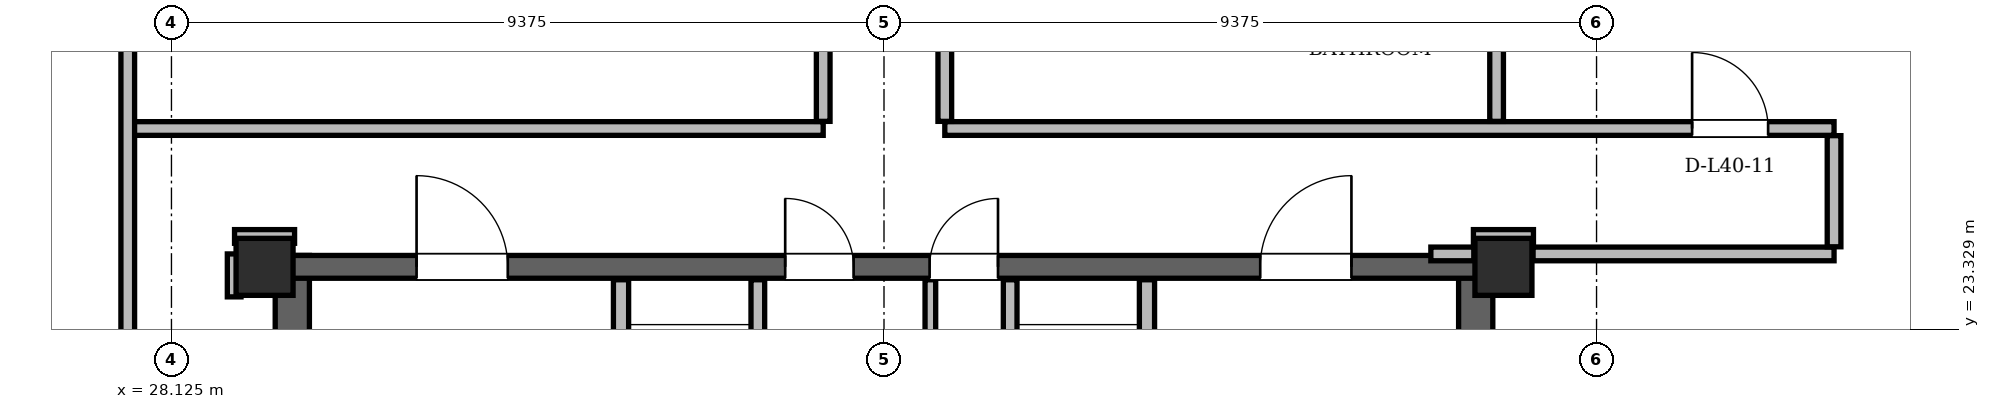
"""IFC4 building model, lengths in metres.
Left out: names, types, materials, properties, quantities, classifications, styles, units other than length and angle.
Written with IfcOpenShell. Run it as: python <this file> out.ifc"""

import sys

from ifc_helpers import new_model, si_unit, direction, frame, frame_2d, origin, origin_2d, place, context, subcontext, project, spatial, rectangle, hollow_rectangle, extrude, element, fill, save


model = new_model("IFC4")
c1 = context("Model", 3, precision=1e-05, world=origin(), true_north=direction((0.0, 1.0)))
c2 = subcontext(c1, "Body", "Model", "MODEL_VIEW")
j1 = project(units=[si_unit("LENGTHUNIT", "METRE"), si_unit("PLANEANGLEUNIT", "RADIAN")], contexts=[c1])
p1 = place(None, origin())
s1 = spatial("IfcSite", under=j1, at=p1, CompositionType="ELEMENT")
p2 = place(p1, origin())
s2 = spatial("IfcBuilding", under=s1, at=p2, CompositionType="ELEMENT")
p3 = place(p2, frame((0.0, 0.0, 153.0)))
s3 = spatial("IfcBuildingStorey", under=s2, at=p3, CompositionType="ELEMENT", Elevation=153.0)
for number, where, z_axis, x_axis in (
    (1, (45.65, 24.15, 0.0), (0.0, 0.0, 1.0), (1.0, 0.0, 0.0)),
    (2, (29.35, 24.15, 0.0), (0.0, 0.0, 1.0), (1.0, 0.0, 0.0)),
):
    element("IfcColumn", number, at=place(p3, frame(where, z_axis=z_axis, x_axis=x_axis)), inside=s3, PredefinedType="COLUMN", context=c2, shape_type="SweptSolid", body=[
        extrude(hollow_rectangle(XDim=0.75, YDim=0.75, WallThickness=0.06, at=origin_2d()), origin(), (0.0, 0.0, 1.0), 3.6),
    ])
for number, where, z_axis, x_axis in (
    (3, (29.715, 11.0, 0.0), (0.0, 0.0, 1.0), (0.0, 1.0, 0.0)),
    (4, (45.285, 11.0, 0.0), (0.0, 0.0, 1.0), (0.0, 1.0, 0.0)),
):
    element("IfcWall", number, at=place(p3, frame(where, z_axis=z_axis, x_axis=x_axis)), inside=s3, PredefinedType="SHEAR", context=c2, shape_type="SweptSolid", body=[
        extrude(rectangle(XDim=13.3, YDim=0.45, at=frame_2d((6.65, 0.0))), origin(), (0.0, 0.0, 1.0), 3.38),
    ])
p4 = place(p3, frame((29.65, 24.15, 0.0), z_axis=(0.0, 0.0, 1.0), x_axis=(1.0, 0.0, 0.0)))
e5 = element("IfcWall", 5, at=p4, inside=s3, PredefinedType="SHEAR", context=c2, shape_type="SweptSolid", body=[
    extrude(rectangle(XDim=15.7, YDim=0.3, at=frame_2d((7.85, 0.0))), origin(), (0.0, 0.0, 1.0), 3.38),
])
p5 = place(p4, frame((1.7, 0.0, 0.0)))
e6 = element("IfcOpeningElement", 6, at=p5, cuts=e5, PredefinedType="OPENING", context=c2, shape_type="SweptSolid", body=[
    extrude(rectangle(XDim=1.2, YDim=2.2, at=frame_2d((0.6, 1.1))), frame((0.0, 0.15, 0.0), z_axis=(0.0, -1.0, 0.0), x_axis=(1.0, 0.0, 0.0)), (0.0, 0.0, 1.0), 0.3),
])
p6 = place(p4, frame((12.8, 0.0, 0.0)))
e7 = element("IfcOpeningElement", 7, at=p6, cuts=e5, PredefinedType="OPENING", context=c2, shape_type="SweptSolid", body=[
    extrude(rectangle(XDim=1.2, YDim=2.2, at=frame_2d((0.6, 1.1))), frame((0.0, 0.15, 0.0), z_axis=(0.0, -1.0, 0.0), x_axis=(1.0, 0.0, 0.0)), (0.0, 0.0, 1.0), 0.3),
])
p7 = place(p4, frame((6.55, 0.0, 0.0)))
e8 = element("IfcOpeningElement", 8, at=p7, cuts=e5, PredefinedType="OPENING", context=c2, shape_type="SweptSolid", body=[
    extrude(rectangle(XDim=0.9, YDim=2.05, at=frame_2d((0.45, 1.025))), frame((0.0, 0.15, 0.0), z_axis=(0.0, -1.0, 0.0), x_axis=(1.0, 0.0, 0.0)), (0.0, 0.0, 1.0), 0.3),
])
p8 = place(p4, frame((8.45, 0.0, 0.0)))
e9 = element("IfcOpeningElement", 9, at=p8, cuts=e5, PredefinedType="OPENING", context=c2, shape_type="SweptSolid", body=[
    extrude(rectangle(XDim=0.9, YDim=2.05, at=frame_2d((0.45, 1.025))), frame((0.0, 0.15, 0.0), z_axis=(0.0, -1.0, 0.0), x_axis=(1.0, 0.0, 0.0)), (0.0, 0.0, 1.0), 0.3),
])
p9 = place(p3, frame((59.952, 12.544, 0.0), z_axis=(0.0, 0.0, 1.0), x_axis=(-0.500000946011, 0.866024857604, 0.0)))
e10 = element("IfcWall", 10, at=p9, inside=s3, PredefinedType="SOLIDWALL", context=c2, shape_type="SweptSolid", body=[
    extrude(rectangle(XDim=35.54, YDim=0.34, at=frame_2d((17.77, 0.0))), origin(), (0.0, 0.0, 1.0), 2.6),
])
p10 = place(p9, frame((6.579, 0.0, 0.0)))
e11 = element("IfcOpeningElement", 11, at=p10, cuts=e10, PredefinedType="OPENING", context=c2, shape_type="SweptSolid", body=[
    extrude(rectangle(XDim=1.5, YDim=2.2, at=frame_2d((0.75, 1.1))), frame((0.0, 0.17, 0.0), z_axis=(0.0, -1.0, 0.0), x_axis=(1.0, 0.0, 0.0)), (0.0, 0.0, 1.0), 0.34),
])
p11 = place(p9, frame((26.105, 0.0, 0.0)))
e12 = element("IfcOpeningElement", 12, at=p11, cuts=e10, PredefinedType="OPENING", context=c2, shape_type="SweptSolid", body=[
    extrude(rectangle(XDim=1.3, YDim=2.2, at=frame_2d((0.65, 1.1))), frame((0.0, 0.17, 0.0), z_axis=(0.0, -1.0, 0.0), x_axis=(1.0, 0.0, 0.0)), (0.0, 0.0, 1.0), 0.34),
])
p12 = place(p9, frame((0.816, 0.0, 0.85)))
e13 = element("IfcOpeningElement", 13, at=p12, cuts=e10, PredefinedType="OPENING", context=c2, shape_type="SweptSolid", body=[
    extrude(rectangle(XDim=1.2, YDim=1.48, at=frame_2d((0.6, 0.74))), frame((0.0, 0.17, 0.0), z_axis=(0.0, -1.0, 0.0), x_axis=(1.0, 0.0, 0.0)), (0.0, 0.0, 1.0), 0.34),
])
p13 = place(p9, frame((17.181, 0.0, 0.85)))
e14 = element("IfcOpeningElement", 14, at=p13, cuts=e10, PredefinedType="OPENING", context=c2, shape_type="SweptSolid", body=[
    extrude(rectangle(XDim=2.6, YDim=1.64, at=frame_2d((1.3, 0.82))), frame((0.0, 0.17, 0.0), z_axis=(0.0, -1.0, 0.0), x_axis=(1.0, 0.0, 0.0)), (0.0, 0.0, 1.0), 0.34),
])
p14 = place(p9, frame((22.978, 0.0, 0.85)))
e15 = element("IfcOpeningElement", 15, at=p14, cuts=e10, PredefinedType="OPENING", context=c2, shape_type="SweptSolid", body=[
    extrude(rectangle(XDim=1.2, YDim=1.48, at=frame_2d((0.6, 0.74))), frame((0.0, 0.17, 0.0), z_axis=(0.0, -1.0, 0.0), x_axis=(1.0, 0.0, 0.0)), (0.0, 0.0, 1.0), 0.34),
])
p15 = place(p9, frame((13.303, 0.0, 0.85)))
e16 = element("IfcOpeningElement", 16, at=p15, cuts=e10, PredefinedType="OPENING", context=c2, shape_type="SweptSolid", body=[
    extrude(rectangle(XDim=1.6, YDim=1.64, at=frame_2d((0.8, 0.82))), frame((0.0, 0.17, 0.0), z_axis=(0.0, -1.0, 0.0), x_axis=(1.0, 0.0, 0.0)), (0.0, 0.0, 1.0), 0.34),
])
p16 = place(p9, frame((31.32, 0.0, 0.85)))
e17 = element("IfcOpeningElement", 17, at=p16, cuts=e10, PredefinedType="OPENING", context=c2, shape_type="SweptSolid", body=[
    extrude(rectangle(XDim=3.0, YDim=1.64, at=frame_2d((1.5, 0.82))), frame((0.0, 0.17, 0.0), z_axis=(0.0, -1.0, 0.0), x_axis=(1.0, 0.0, 0.0)), (0.0, 0.0, 1.0), 0.34),
])
p17 = place(p3, frame((32.818, 43.322, 0.0), z_axis=(0.0, 0.0, 1.0), x_axis=(-0.500000946011, -0.866024857604, 0.0)))
e18 = element("IfcWall", 18, at=p17, inside=s3, PredefinedType="SOLIDWALL", context=c2, shape_type="SweptSolid", body=[
    extrude(rectangle(XDim=35.54, YDim=0.34, at=frame_2d((17.77, 0.0))), origin(), (0.0, 0.0, 1.0), 2.6),
])
p18 = place(p17, frame((6.579, 0.0, 0.0)))
e19 = element("IfcOpeningElement", 19, at=p18, cuts=e18, PredefinedType="OPENING", context=c2, shape_type="SweptSolid", body=[
    extrude(rectangle(XDim=1.5, YDim=2.2, at=frame_2d((0.75, 1.1))), frame((0.0, 0.17, 0.0), z_axis=(0.0, -1.0, 0.0), x_axis=(1.0, 0.0, 0.0)), (0.0, 0.0, 1.0), 0.34),
])
p19 = place(p17, frame((26.005, 0.0, 0.0)))
e20 = element("IfcOpeningElement", 20, at=p19, cuts=e18, PredefinedType="OPENING", context=c2, shape_type="SweptSolid", body=[
    extrude(rectangle(XDim=1.5, YDim=2.2, at=frame_2d((0.75, 1.1))), frame((0.0, 0.17, 0.0), z_axis=(0.0, -1.0, 0.0), x_axis=(1.0, 0.0, 0.0)), (0.0, 0.0, 1.0), 0.34),
])
p20 = place(p17, frame((33.049, 0.0, 0.85)))
e21 = element("IfcOpeningElement", 21, at=p20, cuts=e18, PredefinedType="OPENING", context=c2, shape_type="SweptSolid", body=[
    extrude(rectangle(XDim=1.2, YDim=1.48, at=frame_2d((0.6, 0.74))), frame((0.0, 0.17, 0.0), z_axis=(0.0, -1.0, 0.0), x_axis=(1.0, 0.0, 0.0)), (0.0, 0.0, 1.0), 0.34),
])
p21 = place(p17, frame((17.853, 0.0, 0.85)))
e22 = element("IfcOpeningElement", 22, at=p21, cuts=e18, PredefinedType="OPENING", context=c2, shape_type="SweptSolid", body=[
    extrude(rectangle(XDim=1.2, YDim=1.48, at=frame_2d((0.6, 0.74))), frame((0.0, 0.17, 0.0), z_axis=(0.0, -1.0, 0.0), x_axis=(1.0, 0.0, 0.0)), (0.0, 0.0, 1.0), 0.34),
])
p22 = place(p17, frame((11.661, 0.0, 0.85)))
e23 = element("IfcOpeningElement", 23, at=p22, cuts=e18, PredefinedType="OPENING", context=c2, shape_type="SweptSolid", body=[
    extrude(rectangle(XDim=1.2, YDim=1.48, at=frame_2d((0.6, 0.74))), frame((0.0, 0.17, 0.0), z_axis=(0.0, -1.0, 0.0), x_axis=(1.0, 0.0, 0.0)), (0.0, 0.0, 1.0), 0.34),
])
p23 = place(p17, frame((14.317, 0.0, 0.85)))
e24 = element("IfcOpeningElement", 24, at=p23, cuts=e18, PredefinedType="OPENING", context=c2, shape_type="SweptSolid", body=[
    extrude(rectangle(XDim=1.2, YDim=1.48, at=frame_2d((0.6, 0.74))), frame((0.0, 0.17, 0.0), z_axis=(0.0, -1.0, 0.0), x_axis=(1.0, 0.0, 0.0)), (0.0, 0.0, 1.0), 0.34),
])
p24 = place(p17, frame((2.865, 0.0, 0.85)))
e25 = element("IfcOpeningElement", 25, at=p24, cuts=e18, PredefinedType="OPENING", context=c2, shape_type="SweptSolid", body=[
    extrude(rectangle(XDim=1.6, YDim=1.64, at=frame_2d((0.8, 0.82))), frame((0.0, 0.17, 0.0), z_axis=(0.0, -1.0, 0.0), x_axis=(1.0, 0.0, 0.0)), (0.0, 0.0, 1.0), 0.34),
])
p25 = place(p3, frame((34.04, 19.48, 0.0), z_axis=(0.0, 0.0, 1.0), x_axis=(0.0, 1.0, 0.0)))
e26 = element("IfcWall", 26, at=p25, inside=s3, PredefinedType="PARTITIONING", context=c2, shape_type="SweptSolid", body=[
    extrude(rectangle(XDim=4.5, YDim=0.2, at=frame_2d((2.25, 0.0))), origin(), (0.0, 0.0, 1.0), 2.42),
])
p26 = place(p25, frame((2.12, 0.0, 0.0)))
e27 = element("IfcOpeningElement", 27, at=p26, cuts=e26, PredefinedType="OPENING", context=c2, shape_type="SweptSolid", body=[
    extrude(rectangle(XDim=1.1, YDim=2.2, at=frame_2d((0.55, 1.1))), frame((0.0, 0.1, 0.0), z_axis=(0.0, -1.0, 0.0), x_axis=(1.0, 0.0, 0.0)), (0.0, 0.0, 1.0), 0.2),
])
p27 = place(p3, frame((35.84, 20.96, 0.0), z_axis=(0.0, 0.0, 1.0), x_axis=(0.0, 1.0, 0.0)))
e28 = element("IfcWall", 28, at=p27, inside=s3, PredefinedType="PARTITIONING", context=c2, shape_type="SweptSolid", body=[
    extrude(rectangle(XDim=3.02, YDim=0.18, at=frame_2d((1.51, 0.0))), origin(), (0.0, 0.0, 1.0), 2.42),
])
p28 = place(p3, frame((40.96, 19.48, 0.0), z_axis=(0.0, 0.0, 1.0), x_axis=(0.0, 1.0, 0.0)))
e29 = element("IfcWall", 29, at=p28, inside=s3, PredefinedType="PARTITIONING", context=c2, shape_type="SweptSolid", body=[
    extrude(rectangle(XDim=4.5, YDim=0.2, at=frame_2d((2.25, 0.0))), origin(), (0.0, 0.0, 1.0), 2.42),
])
p29 = place(p28, frame((2.12, 0.0, 0.0)))
e30 = element("IfcOpeningElement", 30, at=p29, cuts=e29, PredefinedType="OPENING", context=c2, shape_type="SweptSolid", body=[
    extrude(rectangle(XDim=1.1, YDim=2.2, at=frame_2d((0.55, 1.1))), frame((0.0, 0.1, 0.0), z_axis=(0.0, -1.0, 0.0), x_axis=(1.0, 0.0, 0.0)), (0.0, 0.0, 1.0), 0.2),
])
p30 = place(p3, frame((39.16, 20.96, 0.0), z_axis=(0.0, 0.0, 1.0), x_axis=(0.0, 1.0, 0.0)))
e31 = element("IfcWall", 31, at=p30, inside=s3, PredefinedType="PARTITIONING", context=c2, shape_type="SweptSolid", body=[
    extrude(rectangle(XDim=3.02, YDim=0.18, at=frame_2d((1.51, 0.0))), origin(), (0.0, 0.0, 1.0), 2.42),
])
p31 = place(p3, frame((38.11, 21.06, 0.0), z_axis=(0.0, 0.0, 1.0), x_axis=(0.0, 1.0, 0.0)))
e32 = element("IfcWall", 32, at=p31, inside=s3, PredefinedType="PARTITIONING", context=c2, shape_type="SweptSolid", body=[
    extrude(rectangle(XDim=2.92, YDim=0.14, at=frame_2d((1.46, 0.0))), origin(), (0.0, 0.0, 1.0), 2.42),
])
p32 = place(p3, frame((44.695, 24.32, 0.0), z_axis=(0.0, 0.0, 1.0), x_axis=(1.0, 0.0, 0.0)))
e33 = element("IfcWall", 33, at=p32, inside=s3, PredefinedType="PARTITIONING", context=c2, shape_type="SweptSolid", body=[
    extrude(rectangle(XDim=0.565, YDim=0.18, at=frame_2d((0.282, 0.0))), origin(), (0.0, 0.0, 1.0), 2.42),
])
p33 = place(p3, frame((46.04, 24.32, 0.0), z_axis=(0.0, 0.0, 1.0), x_axis=(1.0, 0.0, 0.0)))
e34 = element("IfcWall", 34, at=p33, inside=s3, PredefinedType="PARTITIONING", context=c2, shape_type="SweptSolid", body=[
    extrude(rectangle(XDim=3.96, YDim=0.18, at=frame_2d((1.98, 0.0))), origin(), (0.0, 0.0, 1.0), 3.38),
])
for number, where, z_axis, x_axis in (
    (35, (28.955, 24.55, 0.0), (0.0, 0.0, 1.0), (1.0, 0.0, 0.0)),
    (36, (45.255, 24.55, 0.0), (0.0, 0.0, 1.0), (1.0, 0.0, 0.0)),
):
    element("IfcWall", number, at=place(p3, frame(where, z_axis=z_axis, x_axis=x_axis)), inside=s3, PredefinedType="PARTITIONING", context=c2, shape_type="SweptSolid", body=[
        extrude(rectangle(XDim=0.79, YDim=0.18, at=frame_2d((0.395, 0.0))), origin(), (0.0, 0.0, 1.0), 2.842),
    ])
p34 = place(p3, frame((27.55, 25.97, 0.0), z_axis=(0.0, 0.0, 1.0), x_axis=(1.0, 0.0, 0.0)))
e37 = element("IfcWall", 37, at=p34, inside=s3, PredefinedType="PARTITIONING", context=c2, shape_type="SweptSolid", body=[
    extrude(rectangle(XDim=9.15, YDim=0.18, at=frame_2d((4.575, 0.0))), origin(), (0.0, 0.0, 1.0), 2.842),
])
p35 = place(p3, frame((38.3, 25.97, 0.0), z_axis=(0.0, 0.0, 1.0), x_axis=(1.0, 0.0, 0.0)))
e38 = element("IfcWall", 38, at=p35, inside=s3, PredefinedType="PARTITIONING", context=c2, shape_type="SweptSolid", body=[
    extrude(rectangle(XDim=11.7, YDim=0.18, at=frame_2d((5.85, 0.0))), origin(), (0.0, 0.0, 1.0), 2.842),
])
p36 = place(p35, frame((9.832, 0.0, 0.0)))
e39 = element("IfcOpeningElement", 39, at=p36, cuts=e38, PredefinedType="OPENING", context=c2, shape_type="SweptSolid", body=[
    extrude(rectangle(XDim=1.0, YDim=2.18, at=frame_2d((0.5, 1.09))), frame((0.0, 0.09, 0.0), z_axis=(0.0, -1.0, 0.0), x_axis=(1.0, 0.0, 0.0)), (0.0, 0.0, 1.0), 0.18),
])
p37 = place(p3, frame((27.55, 18.544, 0.0), z_axis=(0.0, 0.0, 1.0), x_axis=(0.0, 1.0, 0.0)))
e40 = element("IfcWall", 40, at=p37, inside=s3, PredefinedType="PARTITIONING", context=c2, shape_type="SweptSolid", body=[
    extrude(rectangle(XDim=15.306, YDim=0.18, at=frame_2d((7.653, 0.0))), origin(), (0.0, 0.0, 1.0), 3.38),
])
p38 = place(p3, frame((28.95, 23.755, 0.0), z_axis=(0.0, 0.0, 1.0), x_axis=(0.0, 1.0, 0.0)))
e41 = element("IfcWall", 41, at=p38, inside=s3, PredefinedType="PARTITIONING", context=c2, shape_type="SweptSolid", body=[
    extrude(rectangle(XDim=0.565, YDim=0.18, at=frame_2d((0.283, 0.0))), origin(), (0.0, 0.0, 1.0), 3.38),
])
p39 = place(p3, frame((36.7, 26.064, 0.0), z_axis=(0.0, 0.0, 1.0), x_axis=(0.0, 1.0, 0.0)))
e42 = element("IfcWall", 42, at=p39, inside=s3, PredefinedType="PARTITIONING", context=c2, shape_type="SweptSolid", body=[
    extrude(rectangle(XDim=17.084, YDim=0.18, at=frame_2d((8.542, 0.0))), origin(), (0.0, 0.0, 1.0), 3.38),
])
p40 = place(p39, frame((7.149, 0.0, 0.0)))
e43 = element("IfcOpeningElement", 43, at=p40, cuts=e42, PredefinedType="OPENING", context=c2, shape_type="SweptSolid", body=[
    extrude(rectangle(XDim=1.0, YDim=2.18, at=frame_2d((0.5, 1.09))), frame((0.0, 0.09, 0.0), z_axis=(0.0, -1.0, 0.0), x_axis=(1.0, 0.0, 0.0)), (0.0, 0.0, 1.0), 0.18),
])
p41 = place(p3, frame((38.3, 26.064, 0.0), z_axis=(0.0, 0.0, 1.0), x_axis=(0.0, 1.0, 0.0)))
e44 = element("IfcWall", 44, at=p41, inside=s3, PredefinedType="PARTITIONING", context=c2, shape_type="SweptSolid", body=[
    extrude(rectangle(XDim=13.442, YDim=0.18, at=frame_2d((6.721, 0.0))), origin(), (0.0, 0.0, 1.0), 3.38),
])
p42 = place(p41, frame((7.149, 0.0, 0.0)))
e45 = element("IfcOpeningElement", 45, at=p42, cuts=e44, PredefinedType="OPENING", context=c2, shape_type="SweptSolid", body=[
    extrude(rectangle(XDim=1.0, YDim=2.18, at=frame_2d((0.5, 1.09))), frame((0.0, 0.09, 0.0), z_axis=(0.0, -1.0, 0.0), x_axis=(1.0, 0.0, 0.0)), (0.0, 0.0, 1.0), 0.18),
])
p43 = place(p3, frame((45.56, 26.064, 0.0), z_axis=(0.0, 0.0, 1.0), x_axis=(0.0, 1.0, 0.0)))
e46 = element("IfcWall", 46, at=p43, inside=s3, PredefinedType="PARTITIONING", context=c2, shape_type="SweptSolid", body=[
    extrude(rectangle(XDim=11.06, YDim=0.18, at=frame_2d((5.53, 0.0))), origin(), (0.0, 0.0, 1.0), 3.38),
])
p44 = place(p3, frame((50.0, 24.414, 0.0), z_axis=(0.0, 0.0, 1.0), x_axis=(0.0, 1.0, 0.0)))
e47 = element("IfcWall", 47, at=p44, inside=s3, PredefinedType="PARTITIONING", context=c2, shape_type="SweptSolid", body=[
    extrude(rectangle(XDim=1.462, YDim=0.18, at=frame_2d((0.731, 0.0))), origin(), (0.0, 0.0, 1.0), 3.38),
])
p45 = place(p5, origin())
e48 = element("IfcDoor", 48, at=p45, inside=s3, OperationType="SINGLE_SWING_LEFT", PredefinedType="DOOR", context=c2, shape_type="SweptSolid", body=[
    extrude(rectangle(XDim=1.2, YDim=2.2, at=frame_2d((0.6, 1.1))), frame((0.0, 0.025, 0.0), z_axis=(0.0, -1.0, 0.0), x_axis=(1.0, 0.0, 0.0)), (0.0, 0.0, 1.0), 0.05),
])
fill(e6, e48)
p46 = place(p6, origin())
e49 = element("IfcDoor", 49, at=p46, inside=s3, OperationType="SINGLE_SWING_RIGHT", PredefinedType="DOOR", context=c2, shape_type="SweptSolid", body=[
    extrude(rectangle(XDim=1.2, YDim=2.2, at=frame_2d((0.6, 1.1))), frame((0.0, 0.025, 0.0), z_axis=(0.0, -1.0, 0.0), x_axis=(1.0, 0.0, 0.0)), (0.0, 0.0, 1.0), 0.05),
])
fill(e7, e49)
p47 = place(p7, origin())
e50 = element("IfcDoor", 50, at=p47, inside=s3, OperationType="SINGLE_SWING_LEFT", PredefinedType="DOOR", context=c2, shape_type="SweptSolid", body=[
    extrude(rectangle(XDim=0.9, YDim=2.05, at=frame_2d((0.45, 1.025))), frame((0.0, 0.025, 0.0), z_axis=(0.0, -1.0, 0.0), x_axis=(1.0, 0.0, 0.0)), (0.0, 0.0, 1.0), 0.05),
])
fill(e8, e50)
p48 = place(p8, origin())
e51 = element("IfcDoor", 51, at=p48, inside=s3, OperationType="SINGLE_SWING_RIGHT", PredefinedType="DOOR", context=c2, shape_type="SweptSolid", body=[
    extrude(rectangle(XDim=0.9, YDim=2.05, at=frame_2d((0.45, 1.025))), frame((0.0, 0.025, 0.0), z_axis=(0.0, -1.0, 0.0), x_axis=(1.0, 0.0, 0.0)), (0.0, 0.0, 1.0), 0.05),
])
fill(e9, e51)
p49 = place(p36, origin())
e52 = element("IfcDoor", 52, at=p49, inside=s3, OperationType="SINGLE_SWING_LEFT", PredefinedType="DOOR", context=c2, shape_type="SweptSolid", body=[
    extrude(rectangle(XDim=1.0, YDim=2.18, at=frame_2d((0.5, 1.09))), frame((0.0, 0.025, 0.0), z_axis=(0.0, -1.0, 0.0), x_axis=(1.0, 0.0, 0.0)), (0.0, 0.0, 1.0), 0.05),
])
fill(e39, e52)
save(model, sys.argv[1])
